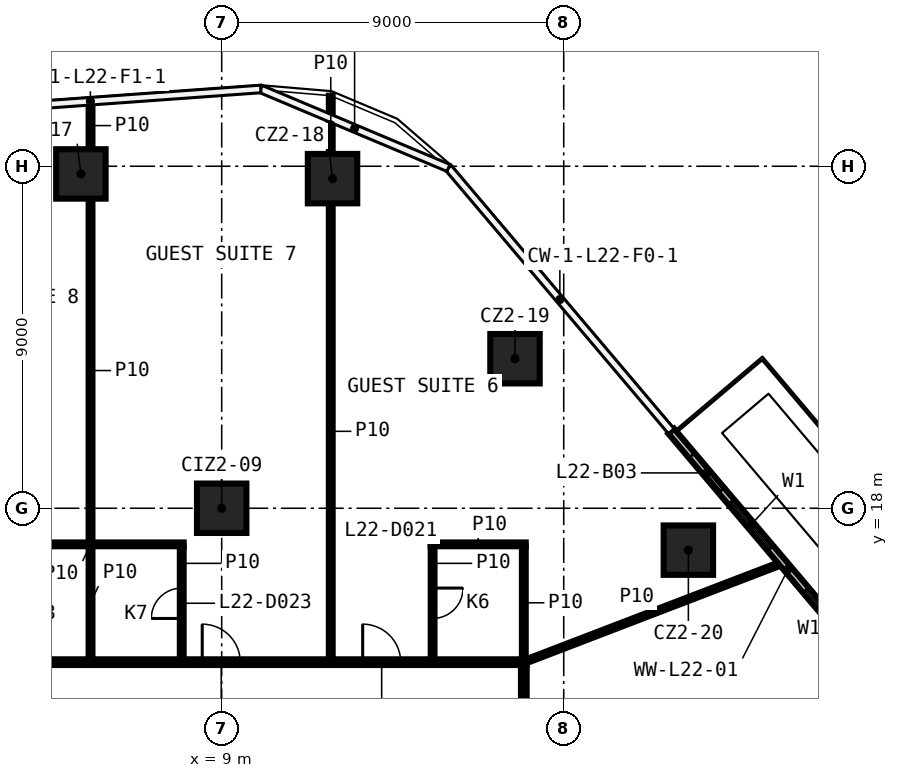
"""IFC4 building model, lengths in metres.
Left out: names, types, materials, properties, quantities, classifications, styles, units other than length and angle.
Written with IfcOpenShell. Run it as: python <this file> out.ifc"""

import sys

from ifc_helpers import new_model, si_unit, direction, frame, frame_2d, origin, origin_2d, place, context, subcontext, project, spatial, rectangle, extrude, element, fill, save


model = new_model("IFC4")
c1 = context("Model", 3, precision=1e-05, world=origin(), true_north=direction((0.0, 1.0)))
c2 = subcontext(c1, "Body", "Model", "MODEL_VIEW")
j1 = project(units=[si_unit("LENGTHUNIT", "METRE"), si_unit("PLANEANGLEUNIT", "RADIAN")], contexts=[c1])
p1 = place(None, origin())
s1 = spatial("IfcSite", under=j1, at=p1, CompositionType="ELEMENT")
p2 = place(p1, origin())
s2 = spatial("IfcBuilding", under=s1, at=p2, CompositionType="ELEMENT")
p3 = place(p2, frame((0.0, 0.0, 106.3)))
s3 = spatial("IfcBuildingStorey", under=s2, at=p3, CompositionType="ELEMENT", Elevation=106.3)
for number, where, z_axis, x_axis in (
    (1, (5.295, 26.798, 0.0), (0.0, 0.0, 1.0), (1.0, 0.0, 0.0)),
    (2, (11.917, 26.674, 0.0), (0.0, 0.0, 1.0), (1.0, 0.0, 0.0)),
    (3, (16.718, 21.935, 0.0), (0.0, 0.0, 1.0), (1.0, 0.0, 0.0)),
    (4, (21.28, 16.898, 0.0), (0.0, 0.0, 1.0), (1.0, 0.0, 0.0)),
    (5, (9.0, 18.0, 0.0), (0.0, 0.0, 1.0), (1.0, 0.0, 0.0)),
):
    element("IfcColumn", number, at=place(p3, frame(where, z_axis=z_axis, x_axis=x_axis)), inside=s3, PredefinedType="COLUMN", context=c2, shape_type="SweptSolid", body=[
        extrude(rectangle(XDim=1.3, YDim=1.3, at=origin_2d()), origin(), (0.0, 0.0, 1.0), 3.3),
    ])
p4 = place(p3, frame((-17.025, 13.95, 0.0), z_axis=(0.0, 0.0, 1.0), x_axis=(1.0, 0.0, 0.0)))
e6 = element("IfcWall", 6, at=p4, inside=s3, PredefinedType="PARTITIONING", context=c2, shape_type="SweptSolid", body=[
    extrude(rectangle(XDim=34.05, YDim=0.15, at=frame_2d((17.025, 0.0))), origin(), (0.0, 0.0, 1.0), 3.3),
])
p5 = place(p4, frame((29.735, 0.0, 0.0)))
e7 = element("IfcOpeningElement", 7, at=p5, cuts=e6, PredefinedType="OPENING", context=c2, shape_type="SweptSolid", body=[
    extrude(rectangle(XDim=1.0, YDim=2.1, at=frame_2d((0.5, 1.05))), frame((0.0, 0.085, 0.0), z_axis=(0.0, -1.0, 0.0), x_axis=(1.0, 0.0, 0.0)), (0.0, 0.0, 1.0), 0.17),
])
p6 = place(p4, frame((25.513, 0.0, 0.0)))
e8 = element("IfcOpeningElement", 8, at=p6, cuts=e6, PredefinedType="OPENING", context=c2, shape_type="SweptSolid", body=[
    extrude(rectangle(XDim=1.0, YDim=2.1, at=frame_2d((0.5, 1.05))), frame((0.0, 0.085, 0.0), z_axis=(0.0, -1.0, 0.0), x_axis=(1.0, 0.0, 0.0)), (0.0, 0.0, 1.0), 0.17),
])
p7 = place(p4, frame((18.631, 0.0, 0.0)))
e9 = element("IfcOpeningElement", 9, at=p7, cuts=e6, PredefinedType="OPENING", context=c2, shape_type="SweptSolid", body=[
    extrude(rectangle(XDim=1.0, YDim=2.1, at=frame_2d((0.5, 1.05))), frame((0.0, 0.085, 0.0), z_axis=(0.0, -1.0, 0.0), x_axis=(1.0, 0.0, 0.0)), (0.0, 0.0, 1.0), 0.17),
])
p8 = place(p4, frame((16.545, 0.0, 0.0)))
e10 = element("IfcOpeningElement", 10, at=p8, cuts=e6, PredefinedType="OPENING", context=c2, shape_type="SweptSolid", body=[
    extrude(rectangle(XDim=1.0, YDim=2.1, at=frame_2d((0.5, 1.05))), frame((0.0, 0.085, 0.0), z_axis=(0.0, -1.0, 0.0), x_axis=(1.0, 0.0, 0.0)), (0.0, 0.0, 1.0), 0.17),
])
p9 = place(p4, frame((9.659, 0.0, 0.0)))
e11 = element("IfcOpeningElement", 11, at=p9, cuts=e6, PredefinedType="OPENING", context=c2, shape_type="SweptSolid", body=[
    extrude(rectangle(XDim=1.0, YDim=2.1, at=frame_2d((0.5, 1.05))), frame((0.0, 0.085, 0.0), z_axis=(0.0, -1.0, 0.0), x_axis=(1.0, 0.0, 0.0)), (0.0, 0.0, 1.0), 0.17),
])
p10 = place(p4, frame((7.577, 0.0, 0.0)))
e12 = element("IfcOpeningElement", 12, at=p10, cuts=e6, PredefinedType="OPENING", context=c2, shape_type="SweptSolid", body=[
    extrude(rectangle(XDim=1.0, YDim=2.1, at=frame_2d((0.5, 1.05))), frame((0.0, 0.085, 0.0), z_axis=(0.0, -1.0, 0.0), x_axis=(1.0, 0.0, 0.0)), (0.0, 0.0, 1.0), 0.17),
])
p11 = place(p4, frame((2.381, 0.0, 0.0)))
e13 = element("IfcOpeningElement", 13, at=p11, cuts=e6, PredefinedType="OPENING", context=c2, shape_type="SweptSolid", body=[
    extrude(rectangle(XDim=0.9, YDim=2.1, at=frame_2d((0.45, 1.05))), frame((0.0, 0.085, 0.0), z_axis=(0.0, -1.0, 0.0), x_axis=(1.0, 0.0, 0.0)), (0.0, 0.0, 1.0), 0.17),
])
p12 = place(p3, frame((3.099, 17.05, 0.0), z_axis=(0.0, 0.0, 1.0), x_axis=(1.0, 0.0, 0.0)))
e14 = element("IfcWall", 14, at=p12, inside=s3, PredefinedType="PARTITIONING", context=c2, shape_type="SweptSolid", body=[
    extrude(rectangle(XDim=4.9, YDim=0.1, at=frame_2d((2.45, 0.0))), origin(), (0.0, 0.0, 1.0), 3.3),
])
p13 = place(p3, frame((14.5, 17.05, 0.0), z_axis=(0.0, 0.0, 1.0), x_axis=(1.0, 0.0, 0.0)))
e15 = element("IfcWall", 15, at=p13, inside=s3, PredefinedType="PARTITIONING", context=c2, shape_type="SweptSolid", body=[
    extrude(rectangle(XDim=2.5, YDim=0.1, at=frame_2d((1.25, 0.0))), origin(), (0.0, 0.0, 1.0), 3.3),
])
p14 = place(p3, frame((16.95, 13.95, 0.0), z_axis=(0.0, 0.0, 1.0), x_axis=(0.933635037811, 0.358225649796, 0.0)))
e16 = element("IfcWall", 16, at=p14, inside=s3, PredefinedType="PARTITIONING", context=c2, shape_type="SweptSolid", body=[
    extrude(rectangle(XDim=7.275, YDim=0.1, at=frame_2d((3.638, 0.0))), origin(), (0.0, 0.0, 1.0), 3.3),
])
p15 = place(p3, frame((16.95, 13.875, 0.0), z_axis=(0.0, 0.0, 1.0), x_axis=(0.0, -1.0, 0.0)))
e17 = element("IfcWall", 17, at=p15, inside=s3, PredefinedType="PARTITIONING", context=c2, shape_type="SweptSolid", body=[
    extrude(rectangle(XDim=27.75, YDim=0.15, at=frame_2d((13.875, 0.0))), origin(), (0.0, 0.0, 1.0), 3.3),
])
p16 = place(p15, frame((24.917, 0.0, 0.0)))
e18 = element("IfcOpeningElement", 18, at=p16, cuts=e17, PredefinedType="OPENING", context=c2, shape_type="SweptSolid", body=[
    extrude(rectangle(XDim=0.9, YDim=2.1, at=frame_2d((0.45, 1.05))), frame((0.0, 0.085, 0.0), z_axis=(0.0, -1.0, 0.0), x_axis=(1.0, 0.0, 0.0)), (0.0, 0.0, 1.0), 0.17),
])
p17 = place(p15, frame((20.086, 0.0, 0.0)))
e19 = element("IfcOpeningElement", 19, at=p17, cuts=e17, PredefinedType="OPENING", context=c2, shape_type="SweptSolid", body=[
    extrude(rectangle(XDim=0.9, YDim=2.1, at=frame_2d((0.45, 1.05))), frame((0.0, 0.085, 0.0), z_axis=(0.0, -1.0, 0.0), x_axis=(1.0, 0.0, 0.0)), (0.0, 0.0, 1.0), 0.17),
])
p18 = place(p15, frame((16.047, 0.0, 0.0)))
e20 = element("IfcOpeningElement", 20, at=p18, cuts=e17, PredefinedType="OPENING", context=c2, shape_type="SweptSolid", body=[
    extrude(rectangle(XDim=0.9, YDim=2.1, at=frame_2d((0.45, 1.05))), frame((0.0, 0.085, 0.0), z_axis=(0.0, -1.0, 0.0), x_axis=(1.0, 0.0, 0.0)), (0.0, 0.0, 1.0), 0.17),
])
p19 = place(p15, frame((11.091, 0.0, 0.0)))
e21 = element("IfcOpeningElement", 21, at=p19, cuts=e17, PredefinedType="OPENING", context=c2, shape_type="SweptSolid", body=[
    extrude(rectangle(XDim=0.9, YDim=2.1, at=frame_2d((0.45, 1.05))), frame((0.0, 0.085, 0.0), z_axis=(0.0, -1.0, 0.0), x_axis=(1.0, 0.0, 0.0)), (0.0, 0.0, 1.0), 0.17),
])
p20 = place(p15, frame((7.093, 0.0, 0.0)))
e22 = element("IfcOpeningElement", 22, at=p20, cuts=e17, PredefinedType="OPENING", context=c2, shape_type="SweptSolid", body=[
    extrude(rectangle(XDim=0.9, YDim=2.1, at=frame_2d((0.45, 1.05))), frame((0.0, 0.085, 0.0), z_axis=(0.0, -1.0, 0.0), x_axis=(1.0, 0.0, 0.0)), (0.0, 0.0, 1.0), 0.17),
])
p21 = place(p15, frame((2.057, 0.0, 0.0)))
e23 = element("IfcOpeningElement", 23, at=p21, cuts=e17, PredefinedType="OPENING", context=c2, shape_type="SweptSolid", body=[
    extrude(rectangle(XDim=0.9, YDim=2.1, at=frame_2d((0.45, 1.05))), frame((0.0, 0.085, 0.0), z_axis=(0.0, -1.0, 0.0), x_axis=(1.0, 0.0, 0.0)), (0.0, 0.0, 1.0), 0.17),
])
p22 = place(p3, frame((16.95, 14.025, 0.0), z_axis=(0.0, 0.0, 1.0), x_axis=(0.0, 1.0, 0.0)))
e24 = element("IfcWall", 24, at=p22, inside=s3, PredefinedType="PARTITIONING", context=c2, shape_type="SweptSolid", body=[
    extrude(rectangle(XDim=2.975, YDim=0.1, at=frame_2d((1.488, 0.0))), origin(), (0.0, 0.0, 1.0), 3.3),
])
p23 = place(p3, frame((14.55, 17.0, 0.0), z_axis=(0.0, 0.0, 1.0), x_axis=(0.0, -1.0, 0.0)))
e25 = element("IfcWall", 25, at=p23, inside=s3, PredefinedType="PARTITIONING", context=c2, shape_type="SweptSolid", body=[
    extrude(rectangle(XDim=2.975, YDim=0.1, at=frame_2d((1.488, 0.0))), origin(), (0.0, 0.0, 1.0), 3.3),
])
p24 = place(p23, frame((1.1, 0.0, 0.0)))
e26 = element("IfcOpeningElement", 26, at=p24, cuts=e25, PredefinedType="OPENING", context=c2, shape_type="SweptSolid", body=[
    extrude(rectangle(XDim=0.8, YDim=2.1, at=frame_2d((0.4, 1.05))), frame((0.0, 0.06, 0.0), z_axis=(0.0, -1.0, 0.0), x_axis=(1.0, 0.0, 0.0)), (0.0, 0.0, 1.0), 0.12),
])
p25 = place(p3, frame((11.87, 14.025, 0.0), z_axis=(0.0, 0.0, 1.0), x_axis=(0.0, 1.0, 0.0)))
e27 = element("IfcWall", 27, at=p25, inside=s3, PredefinedType="PARTITIONING", context=c2, shape_type="SweptSolid", body=[
    extrude(rectangle(XDim=11.999, YDim=0.1, at=frame_2d((6.0, 0.0))), origin(), (0.0, 0.0, 1.0), 3.3),
])
p26 = place(p3, frame((11.87, 27.324, 0.0), z_axis=(0.0, 0.0, 1.0), x_axis=(0.0, 1.0, 0.0)))
e28 = element("IfcWall", 28, at=p26, inside=s3, PredefinedType="PARTITIONING", context=c2, shape_type="SweptSolid", body=[
    extrude(rectangle(XDim=1.531, YDim=0.1, at=frame_2d((0.766, 0.0))), origin(), (0.0, 0.0, 1.0), 3.3),
])
p27 = place(p3, frame((7.949, 14.025, 0.0), z_axis=(0.0, 0.0, 1.0), x_axis=(0.0, 1.0, 0.0)))
e29 = element("IfcWall", 29, at=p27, inside=s3, PredefinedType="PARTITIONING", context=c2, shape_type="SweptSolid", body=[
    extrude(rectangle(XDim=2.975, YDim=0.1, at=frame_2d((1.488, 0.0))), origin(), (0.0, 0.0, 1.0), 3.3),
])
p28 = place(p27, frame((1.075, 0.0, 0.0)))
e30 = element("IfcOpeningElement", 30, at=p28, cuts=e29, PredefinedType="OPENING", context=c2, shape_type="SweptSolid", body=[
    extrude(rectangle(XDim=0.8, YDim=2.1, at=frame_2d((0.4, 1.05))), frame((0.0, 0.06, 0.0), z_axis=(0.0, -1.0, 0.0), x_axis=(1.0, 0.0, 0.0)), (0.0, 0.0, 1.0), 0.12),
])
p29 = place(p3, frame((5.549, 14.025, 0.0), z_axis=(0.0, 0.0, 1.0), x_axis=(0.0, 1.0, 0.0)))
e31 = element("IfcWall", 31, at=p29, inside=s3, PredefinedType="PARTITIONING", context=c2, shape_type="SweptSolid", body=[
    extrude(rectangle(XDim=2.975, YDim=0.1, at=frame_2d((1.488, 0.0))), origin(), (0.0, 0.0, 1.0), 3.3),
])
p30 = place(p3, frame((5.549, 17.1, 0.0), z_axis=(0.0, 0.0, 1.0), x_axis=(0.0, 1.0, 0.0)))
e32 = element("IfcWall", 32, at=p30, inside=s3, PredefinedType="PARTITIONING", context=c2, shape_type="SweptSolid", body=[
    extrude(rectangle(XDim=9.048, YDim=0.1, at=frame_2d((4.524, 0.0))), origin(), (0.0, 0.0, 1.0), 3.3),
])
p31 = place(p3, frame((5.549, 27.448, 0.0), z_axis=(0.0, 0.0, 1.0), x_axis=(0.0, 1.0, 0.0)))
e33 = element("IfcWall", 33, at=p31, inside=s3, PredefinedType="PARTITIONING", context=c2, shape_type="SweptSolid", body=[
    extrude(rectangle(XDim=1.243, YDim=0.1, at=frame_2d((0.622, 0.0))), origin(), (0.0, 0.0, 1.0), 3.3),
])
p32 = place(p3, frame((29.626, 9.636, 0.0), z_axis=(0.0, 0.0, 1.0), x_axis=(-0.6460547702, 0.763291054514, 0.0)))
e34 = element("IfcWall", 34, at=p32, inside=s3, PredefinedType="SOLIDWALL", context=c2, shape_type="SweptSolid", body=[
    extrude(rectangle(XDim=13.615, YDim=0.2, at=frame_2d((6.808, 0.0))), origin(), (0.0, 0.0, 1.0), 3.3),
])
p33 = place(p32, frame((2.0, 0.0, 0.6)))
e35 = element("IfcOpeningElement", 35, at=p33, cuts=e34, PredefinedType="OPENING", context=c2, shape_type="SweptSolid", body=[
    extrude(rectangle(XDim=1.6, YDim=2.4, at=frame_2d((0.8, 1.2))), frame((0.0, 0.11, 0.0), z_axis=(0.0, -1.0, 0.0), x_axis=(1.0, 0.0, 0.0)), (0.0, 0.0, 1.0), 0.22),
])
p34 = place(p32, frame((0.5, 0.0, 0.0)))
e36 = element("IfcOpeningElement", 36, at=p34, cuts=e34, PredefinedType="OPENING", context=c2, shape_type="SweptSolid", body=[
    extrude(rectangle(XDim=1.2, YDim=2.4, at=frame_2d((0.6, 1.2))), frame((0.0, 0.11, 0.0), z_axis=(0.0, -1.0, 0.0), x_axis=(1.0, 0.0, 0.0)), (0.0, 0.0, 1.0), 0.22),
])
p35 = place(p32, frame((6.538, 0.0, 0.6)))
e37 = element("IfcOpeningElement", 37, at=p35, cuts=e34, PredefinedType="OPENING", context=c2, shape_type="SweptSolid", body=[
    extrude(rectangle(XDim=1.6, YDim=2.4, at=frame_2d((0.8, 1.2))), frame((0.0, 0.11, 0.0), z_axis=(0.0, -1.0, 0.0), x_axis=(1.0, 0.0, 0.0)), (0.0, 0.0, 1.0), 0.22),
])
p36 = place(p32, frame((5.038, 0.0, 0.0)))
e38 = element("IfcOpeningElement", 38, at=p36, cuts=e34, PredefinedType="OPENING", context=c2, shape_type="SweptSolid", body=[
    extrude(rectangle(XDim=1.2, YDim=2.4, at=frame_2d((0.6, 1.2))), frame((0.0, 0.11, 0.0), z_axis=(0.0, -1.0, 0.0), x_axis=(1.0, 0.0, 0.0)), (0.0, 0.0, 1.0), 0.22),
])
p37 = place(p32, frame((9.577, 0.0, 0.6)))
e39 = element("IfcOpeningElement", 39, at=p37, cuts=e34, PredefinedType="OPENING", context=c2, shape_type="SweptSolid", body=[
    extrude(rectangle(XDim=1.6, YDim=2.4, at=frame_2d((0.8, 1.2))), frame((0.0, 0.11, 0.0), z_axis=(0.0, -1.0, 0.0), x_axis=(1.0, 0.0, 0.0)), (0.0, 0.0, 1.0), 0.22),
])
p38 = place(p32, frame((11.577, 0.0, 0.0)))
e40 = element("IfcOpeningElement", 40, at=p38, cuts=e34, PredefinedType="OPENING", context=c2, shape_type="SweptSolid", body=[
    extrude(rectangle(XDim=1.2, YDim=2.4, at=frame_2d((0.6, 1.2))), frame((0.0, 0.11, 0.0), z_axis=(0.0, -1.0, 0.0), x_axis=(1.0, 0.0, 0.0)), (0.0, 0.0, 1.0), 0.22),
])
p39 = place(p24, origin())
e41 = element("IfcDoor", 41, at=p39, inside=s3, OperationType="SINGLE_SWING_LEFT", PredefinedType="DOOR", context=c2, shape_type="SweptSolid", body=[
    extrude(rectangle(XDim=0.8, YDim=2.1, at=frame_2d((0.4, 1.05))), frame((0.0, 0.025, 0.0), z_axis=(0.0, -1.0, 0.0), x_axis=(1.0, 0.0, 0.0)), (0.0, 0.0, 1.0), 0.05),
])
fill(e26, e41)
p40 = place(p5, origin())
e42 = element("IfcDoor", 42, at=p40, inside=s3, OperationType="SINGLE_SWING_RIGHT", PredefinedType="DOOR", context=c2, shape_type="SweptSolid", body=[
    extrude(rectangle(XDim=1.0, YDim=2.1, at=frame_2d((0.5, 1.05))), frame((0.0, 0.025, 0.0), z_axis=(0.0, -1.0, 0.0), x_axis=(1.0, 0.0, 0.0)), (0.0, 0.0, 1.0), 0.05),
])
fill(e7, e42)
p41 = place(p28, origin())
e43 = element("IfcDoor", 43, at=p41, inside=s3, OperationType="SINGLE_SWING_RIGHT", PredefinedType="DOOR", context=c2, shape_type="SweptSolid", body=[
    extrude(rectangle(XDim=0.8, YDim=2.1, at=frame_2d((0.4, 1.05))), frame((0.0, 0.025, 0.0), z_axis=(0.0, -1.0, 0.0), x_axis=(1.0, 0.0, 0.0)), (0.0, 0.0, 1.0), 0.05),
])
fill(e30, e43)
p42 = place(p6, origin())
e44 = element("IfcDoor", 44, at=p42, inside=s3, OperationType="SINGLE_SWING_LEFT", PredefinedType="DOOR", context=c2, shape_type="SweptSolid", body=[
    extrude(rectangle(XDim=1.0, YDim=2.1, at=frame_2d((0.5, 1.05))), frame((0.0, 0.025, 0.0), z_axis=(0.0, -1.0, 0.0), x_axis=(1.0, 0.0, 0.0)), (0.0, 0.0, 1.0), 0.05),
])
fill(e8, e44)
p43 = place(p35, origin())
e45 = element("IfcWindow", 45, at=p43, inside=s3, PartitioningType="SINGLE_PANEL", PredefinedType="WINDOW", context=c2, shape_type="SweptSolid", body=[
    extrude(rectangle(XDim=1.6, YDim=2.4, at=frame_2d((0.8, 1.2))), frame((0.0, 0.03, 0.0), z_axis=(0.0, -1.0, 0.0), x_axis=(1.0, 0.0, 0.0)), (0.0, 0.0, 1.0), 0.06),
])
fill(e37, e45)
p44 = place(p37, origin())
e46 = element("IfcWindow", 46, at=p44, inside=s3, PartitioningType="SINGLE_PANEL", PredefinedType="WINDOW", context=c2, shape_type="SweptSolid", body=[
    extrude(rectangle(XDim=1.6, YDim=2.4, at=frame_2d((0.8, 1.2))), frame((0.0, 0.03, 0.0), z_axis=(0.0, -1.0, 0.0), x_axis=(1.0, 0.0, 0.0)), (0.0, 0.0, 1.0), 0.06),
])
fill(e39, e46)
p45 = place(p38, origin())
e47 = element("IfcDoor", 47, at=p45, inside=s3, OperationType="SLIDING_TO_LEFT", PredefinedType="DOOR", context=c2, shape_type="SweptSolid", body=[
    extrude(rectangle(XDim=1.2, YDim=2.4, at=frame_2d((0.6, 1.2))), frame((0.0, 0.025, 0.0), z_axis=(0.0, -1.0, 0.0), x_axis=(1.0, 0.0, 0.0)), (0.0, 0.0, 1.0), 0.05),
])
fill(e40, e47)
save(model, sys.argv[1])
